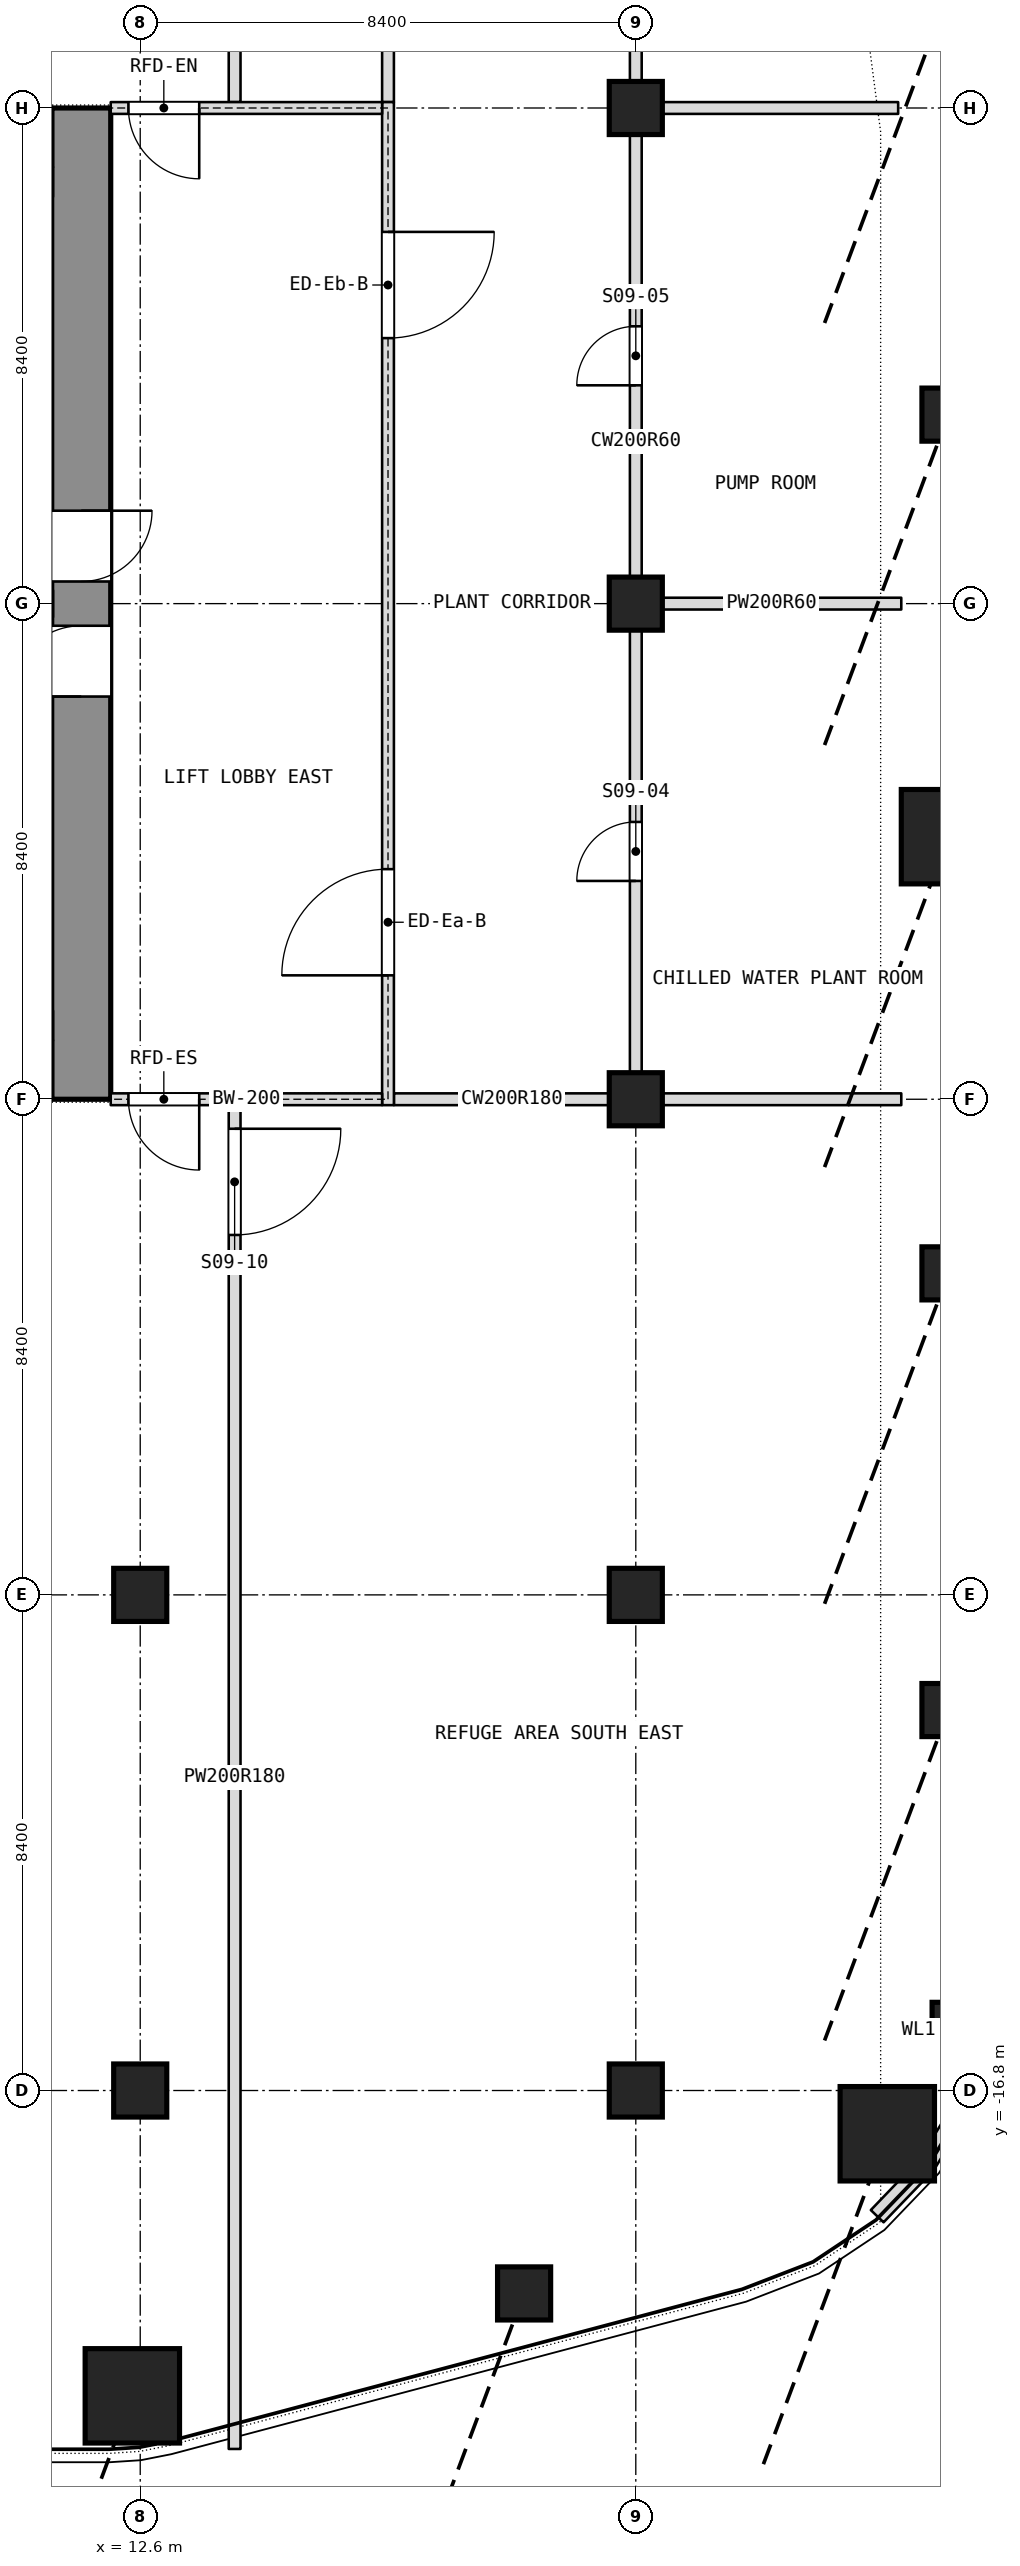
"""IFC4 building model, lengths in metres.
Left out: names, types, materials, properties, quantities, classifications, styles, units other than length and angle.
Written with IfcOpenShell. Run it as: python <this file> out.ifc"""

import sys

from ifc_helpers import new_model, si_unit, direction, frame, frame_2d, origin, origin_2d, place, context, subcontext, project, spatial, rectangle, i_section, extrude, element, fill, save


model = new_model("IFC4")
c1 = context("Model", 3, precision=1e-05, world=origin(), true_north=direction((0.0, 1.0)))
c2 = subcontext(c1, "Body", "Model", "MODEL_VIEW")
j1 = project(units=[si_unit("LENGTHUNIT", "METRE"), si_unit("PLANEANGLEUNIT", "RADIAN")], contexts=[c1])
p1 = place(None, origin())
s1 = spatial("IfcSite", under=j1, at=p1, CompositionType="ELEMENT")
p2 = place(p1, origin())
s2 = spatial("IfcBuilding", under=s1, at=p2, CompositionType="ELEMENT")
p3 = place(p2, frame((0.0, 0.0, 169.7)))
s3 = spatial("IfcBuildingStorey", under=s2, at=p3, CompositionType="ELEMENT", Elevation=169.7)
p4 = place(p3, frame((11.6, 0.0, 0.0), z_axis=(0.0, 0.0, 1.0), x_axis=(0.0, 1.0, 0.0)))
e1 = element("IfcWall", 1, at=p4, inside=s3, PredefinedType="SHEAR", context=c2, shape_type="SweptSolid", body=[
    extrude(rectangle(XDim=16.8, YDim=1.0, at=frame_2d((8.4, 0.0))), origin(), (0.0, 0.0, 1.0), 10.8),
])
p5 = place(p4, frame((6.825, 0.0, 0.0)))
e2 = element("IfcOpeningElement", 2, at=p5, cuts=e1, PredefinedType="OPENING", context=c2, shape_type="SweptSolid", body=[
    extrude(rectangle(XDim=1.2, YDim=2.1, at=frame_2d((0.6, 1.05))), frame((0.0, 0.5, 0.0), z_axis=(0.0, -1.0, 0.0), x_axis=(1.0, 0.0, 0.0)), (0.0, 0.0, 1.0), 1.0),
])
p6 = place(p4, frame((8.775, 0.0, 0.0)))
e3 = element("IfcOpeningElement", 3, at=p6, cuts=e1, PredefinedType="OPENING", context=c2, shape_type="SweptSolid", body=[
    extrude(rectangle(XDim=1.2, YDim=2.1, at=frame_2d((0.6, 1.05))), frame((0.0, 0.5, 0.0), z_axis=(0.0, -1.0, 0.0), x_axis=(1.0, 0.0, 0.0)), (0.0, 0.0, 1.0), 1.0),
])
for number, where, z_axis, x_axis in (
    (4, (12.6, -16.8, 0.0), (0.0, 0.0, 1.0), (1.0, 0.0, 0.0)),
    (5, (12.6, -8.4, 0.0), (0.0, 0.0, 1.0), (1.0, 0.0, 0.0)),
    (6, (21.0, -16.8, 0.0), (0.0, 0.0, 1.0), (1.0, 0.0, 0.0)),
    (7, (21.0, -8.4, 0.0), (0.0, 0.0, 1.0), (1.0, 0.0, 0.0)),
    (8, (21.0, 0.0, 0.0), (0.0, 0.0, 1.0), (1.0, 0.0, 0.0)),
    (9, (21.0, 8.4, 0.0), (0.0, 0.0, 1.0), (1.0, 0.0, 0.0)),
    (10, (21.0, 16.8, 0.0), (0.0, 0.0, 1.0), (1.0, 0.0, 0.0)),
):
    element("IfcColumn", number, at=place(p3, frame(where, z_axis=z_axis, x_axis=x_axis)), inside=s3, PredefinedType="COLUMN", context=c2, shape_type="SweptSolid", body=[
        extrude(rectangle(XDim=0.9, YDim=0.9, at=origin_2d()), origin(), (0.0, 0.0, 1.0), 10.8),
    ])
for number, where, z_axis, x_axis in (
    (11, (26.3, 11.603, 0.0), (0.0, 0.0, 1.0), (1.0, 0.0, 0.0)),
    (12, (26.3, 4.45, 0.0), (0.0, 0.0, 1.0), (1.0, 0.0, 0.0)),
    (13, (26.3, -2.951, 0.0), (0.0, 0.0, 1.0), (1.0, 0.0, 0.0)),
    (14, (26.3, -10.352, 0.0), (0.0, 0.0, 1.0), (1.0, 0.0, 0.0)),
):
    element("IfcColumn", number, at=place(p3, frame(where, z_axis=z_axis, x_axis=x_axis)), inside=s3, PredefinedType="COLUMN", context=c2, shape_type="SweptSolid", body=[
        extrude(i_section(OverallWidth=0.306, OverallDepth=0.524, WebThickness=0.024, FlangeThickness=0.04, FilletRadius=0.027, at=origin_2d()), origin(), (0.0, 0.0, 1.0), 10.14),
    ])
p7 = place(p3, frame((26.175, -15.567, -0.3), z_axis=(0.0, 0.0, 1.0), x_axis=(1.0, 0.0, 0.0)))
e15 = element("IfcColumn", 15, at=p7, inside=s3, PredefinedType="COLUMN", context=c2, shape_type="SweptSolid", body=[
    extrude(i_section(OverallWidth=0.306, OverallDepth=0.524, WebThickness=0.024, FlangeThickness=0.04, FilletRadius=0.027, at=origin_2d()), origin(), (0.0, 0.0, 1.0), 10.44),
])
p8 = place(p3, frame((25.258, -17.529, 0.0), z_axis=(0.0, 0.0, 1.0), x_axis=(1.0, 0.0, 0.0)))
e16 = element("IfcColumn", 16, at=p8, inside=s3, PredefinedType="COLUMN", context=c2, shape_type="SweptSolid", body=[
    extrude(i_section(OverallWidth=0.306, OverallDepth=0.524, WebThickness=0.024, FlangeThickness=0.04, FilletRadius=0.027, at=origin_2d()), origin(), (0.0, 0.0, 1.0), 10.14),
])
p9 = place(p3, frame((21.0, -0.1, 0.0), z_axis=(0.0, 0.0, 1.0), x_axis=(0.0, 1.0, 0.0)))
e17 = element("IfcWall", 17, at=p9, inside=s3, PredefinedType="PARTITIONING", context=c2, shape_type="SweptSolid", body=[
    extrude(rectangle(XDim=22.493, YDim=0.2, at=frame_2d((11.247, 0.0))), origin(), (0.0, 0.0, 1.0), 10.14),
])
p10 = place(p9, frame((3.8, 0.0, 0.0)))
e18 = element("IfcOpeningElement", 18, at=p10, cuts=e17, PredefinedType="OPENING", context=c2, shape_type="SweptSolid", body=[
    extrude(rectangle(XDim=1.0, YDim=2.1, at=frame_2d((0.5, 1.05))), frame((0.0, 0.1, 0.0), z_axis=(0.0, -1.0, 0.0), x_axis=(1.0, 0.0, 0.0)), (0.0, 0.0, 1.0), 0.2),
])
p11 = place(p9, frame((12.2, 0.0, 0.0)))
e19 = element("IfcOpeningElement", 19, at=p11, cuts=e17, PredefinedType="OPENING", context=c2, shape_type="SweptSolid", body=[
    extrude(rectangle(XDim=1.0, YDim=2.1, at=frame_2d((0.5, 1.05))), frame((0.0, 0.1, 0.0), z_axis=(0.0, -1.0, 0.0), x_axis=(1.0, 0.0, 0.0)), (0.0, 0.0, 1.0), 0.2),
])
p12 = place(p9, frame((19.146, 0.0, 0.0)))
e20 = element("IfcOpeningElement", 20, at=p12, cuts=e17, PredefinedType="OPENING", context=c2, shape_type="SweptSolid", body=[
    extrude(rectangle(XDim=1.0, YDim=2.1, at=frame_2d((0.5, 1.05))), frame((0.0, 0.1, 0.0), z_axis=(0.0, -1.0, 0.0), x_axis=(1.0, 0.0, 0.0)), (0.0, 0.0, 1.0), 0.2),
])
p13 = place(p3, frame((16.8, 16.9, 0.0), z_axis=(0.0, 0.0, 1.0), x_axis=(0.0, 1.0, 0.0)))
e21 = element("IfcWall", 21, at=p13, inside=s3, PredefinedType="PARTITIONING", context=c2, shape_type="SweptSolid", body=[
    extrude(rectangle(XDim=5.8, YDim=0.2, at=frame_2d((2.9, 0.0))), origin(), (0.0, 0.0, 1.0), 10.14),
])
p14 = place(p13, frame((2.4, 0.0, 0.0)))
e22 = element("IfcOpeningElement", 22, at=p14, cuts=e21, PredefinedType="OPENING", context=c2, shape_type="SweptSolid", body=[
    extrude(rectangle(XDim=1.0, YDim=2.1, at=frame_2d((0.5, 1.05))), frame((0.0, 0.1, 0.0), z_axis=(0.0, -1.0, 0.0), x_axis=(1.0, 0.0, 0.0)), (0.0, 0.0, 1.0), 0.2),
])
p15 = place(p3, frame((14.2, -22.875, 0.0), z_axis=(0.0, 0.0, 1.0), x_axis=(0.0, 1.0, 0.0)))
e23 = element("IfcWall", 23, at=p15, inside=s3, PredefinedType="PARTITIONING", context=c2, shape_type="SweptSolid", body=[
    extrude(rectangle(XDim=22.775, YDim=0.2, at=frame_2d((11.387, 0.0))), origin(), (0.0, 0.0, 1.0), 10.54),
])
p16 = place(p15, frame((20.575, 0.0, 0.0)))
e24 = element("IfcOpeningElement", 24, at=p16, cuts=e23, PredefinedType="OPENING", context=c2, shape_type="SweptSolid", body=[
    extrude(rectangle(XDim=1.8, YDim=2.1, at=frame_2d((0.9, 1.05))), frame((0.0, 0.1, 0.0), z_axis=(0.0, -1.0, 0.0), x_axis=(1.0, 0.0, 0.0)), (0.0, 0.0, 1.0), 0.2),
])
p17 = place(p3, frame((14.2, 16.9, 0.0), z_axis=(0.0, 0.0, 1.0), x_axis=(0.0, 1.0, 0.0)))
e25 = element("IfcWall", 25, at=p17, inside=s3, PredefinedType="PARTITIONING", context=c2, shape_type="SweptSolid", body=[
    extrude(rectangle(XDim=5.8, YDim=0.2, at=frame_2d((2.9, 0.0))), origin(), (0.0, 0.0, 1.0), 10.54),
])
p18 = place(p3, frame((21.1, 0.0, 0.0), z_axis=(0.0, 0.0, 1.0), x_axis=(1.0, 0.0, 0.0)))
e26 = element("IfcWall", 26, at=p18, inside=s3, PredefinedType="PARTITIONING", context=c2, shape_type="SweptSolid", body=[
    extrude(rectangle(XDim=4.4, YDim=0.2, at=frame_2d((2.2, 0.0))), origin(), (0.0, 0.0, 1.0), 10.14),
])
p19 = place(p3, frame((16.9, 0.0, 0.0), z_axis=(0.0, 0.0, 1.0), x_axis=(1.0, 0.0, 0.0)))
e27 = element("IfcWall", 27, at=p19, inside=s3, PredefinedType="PARTITIONING", context=c2, shape_type="SweptSolid", body=[
    extrude(rectangle(XDim=4.0, YDim=0.2, at=frame_2d((2.0, 0.0))), origin(), (0.0, 0.0, 1.0), 10.14),
])
p20 = place(p3, frame((21.1, 8.4, 0.0), z_axis=(0.0, 0.0, 1.0), x_axis=(1.0, 0.0, 0.0)))
e28 = element("IfcWall", 28, at=p20, inside=s3, PredefinedType="PARTITIONING", context=c2, shape_type="SweptSolid", body=[
    extrude(rectangle(XDim=4.4, YDim=0.2, at=frame_2d((2.2, 0.0))), origin(), (0.0, 0.0, 1.0), 10.14),
])
p21 = place(p3, frame((21.1, 16.8, 0.0), z_axis=(0.0, 0.0, 1.0), x_axis=(1.0, 0.0, 0.0)))
e29 = element("IfcWall", 29, at=p21, inside=s3, PredefinedType="PARTITIONING", context=c2, shape_type="SweptSolid", body=[
    extrude(rectangle(XDim=4.347, YDim=0.2, at=frame_2d((2.173, 0.0))), origin(), (0.0, 0.0, 1.0), 10.14),
])
p22 = place(p3, frame((26.608, -16.947, 10.8), z_axis=(0.0, 0.0, 1.0), x_axis=(-0.519698377403, -0.854349809226, 0.0)))
e30 = element("IfcWall", 30, at=p22, inside=s3, PredefinedType="PARAPET", context=c2, shape_type="SweptSolid", body=[
    extrude(rectangle(XDim=1.309, YDim=0.3, at=frame_2d((0.654, 0.0))), origin(), (0.0, 0.0, 1.0), 1.1),
])
p23 = place(p3, frame((25.948, -18.039, 10.8), z_axis=(0.0, 0.0, 1.0), x_axis=(-0.692535941108, -0.721383372607, 0.0)))
e31 = element("IfcWall", 31, at=p23, inside=s3, PredefinedType="PARAPET", context=c2, shape_type="SweptSolid", body=[
    extrude(rectangle(XDim=1.236, YDim=0.3, at=frame_2d((0.618, 0.0))), origin(), (0.0, 0.0, 1.0), 1.1),
])
p24 = place(p3, frame((16.8, -0.1, 0.0), z_axis=(0.0, 0.0, 1.0), x_axis=(0.0, 1.0, 0.0)))
e32 = element("IfcWall", 32, at=p24, inside=s3, PredefinedType="PARTITIONING", context=c2, shape_type="SweptSolid", body=[
    extrude(rectangle(XDim=17.0, YDim=0.2, at=frame_2d((8.5, 0.0))), origin(), (0.0, 0.0, 1.0), 10.54),
])
p25 = place(p24, frame((2.2, 0.0, 0.0)))
e33 = element("IfcOpeningElement", 33, at=p25, cuts=e32, PredefinedType="OPENING", context=c2, shape_type="SweptSolid", body=[
    extrude(rectangle(XDim=1.8, YDim=2.1, at=frame_2d((0.9, 1.05))), frame((0.0, 0.1, 0.0), z_axis=(0.0, -1.0, 0.0), x_axis=(1.0, 0.0, 0.0)), (0.0, 0.0, 1.0), 0.2),
])
p26 = place(p24, frame((13.0, 0.0, 0.0)))
e34 = element("IfcOpeningElement", 34, at=p26, cuts=e32, PredefinedType="OPENING", context=c2, shape_type="SweptSolid", body=[
    extrude(rectangle(XDim=1.8, YDim=2.1, at=frame_2d((0.9, 1.05))), frame((0.0, 0.1, 0.0), z_axis=(0.0, -1.0, 0.0), x_axis=(1.0, 0.0, 0.0)), (0.0, 0.0, 1.0), 0.2),
])
p27 = place(p3, frame((12.1, 0.0, 0.0), z_axis=(0.0, 0.0, 1.0), x_axis=(1.0, 0.0, 0.0)))
e35 = element("IfcWall", 35, at=p27, inside=s3, PredefinedType="PARTITIONING", context=c2, shape_type="SweptSolid", body=[
    extrude(rectangle(XDim=4.6, YDim=0.2, at=frame_2d((2.3, 0.0))), origin(), (0.0, 0.0, 1.0), 10.14),
])
p28 = place(p27, frame((0.3, 0.0, 0.0)))
e36 = element("IfcOpeningElement", 36, at=p28, cuts=e35, PredefinedType="OPENING", context=c2, shape_type="SweptSolid", body=[
    extrude(rectangle(XDim=1.2, YDim=2.1, at=frame_2d((0.6, 1.05))), frame((0.0, 0.1, 0.0), z_axis=(0.0, -1.0, 0.0), x_axis=(1.0, 0.0, 0.0)), (0.0, 0.0, 1.0), 0.2),
])
p29 = place(p3, frame((12.1, 16.8, 0.0), z_axis=(0.0, 0.0, 1.0), x_axis=(1.0, 0.0, 0.0)))
e37 = element("IfcWall", 37, at=p29, inside=s3, PredefinedType="PARTITIONING", context=c2, shape_type="SweptSolid", body=[
    extrude(rectangle(XDim=4.6, YDim=0.2, at=frame_2d((2.3, 0.0))), origin(), (0.0, 0.0, 1.0), 10.14),
])
p30 = place(p29, frame((0.3, 0.0, 0.0)))
e38 = element("IfcOpeningElement", 38, at=p30, cuts=e37, PredefinedType="OPENING", context=c2, shape_type="SweptSolid", body=[
    extrude(rectangle(XDim=1.2, YDim=2.1, at=frame_2d((0.6, 1.05))), frame((0.0, 0.1, 0.0), z_axis=(0.0, -1.0, 0.0), x_axis=(1.0, 0.0, 0.0)), (0.0, 0.0, 1.0), 0.2),
])
p31 = place(p10, origin())
e39 = element("IfcDoor", 39, at=p31, inside=s3, OperationType="SINGLE_SWING_LEFT", PredefinedType="DOOR", context=c2, shape_type="SweptSolid", body=[
    extrude(rectangle(XDim=1.0, YDim=2.1, at=frame_2d((0.5, 1.05))), frame((0.0, 0.025, 0.0), z_axis=(0.0, -1.0, 0.0), x_axis=(1.0, 0.0, 0.0)), (0.0, 0.0, 1.0), 0.05),
])
fill(e18, e39)
p32 = place(p11, origin())
e40 = element("IfcDoor", 40, at=p32, inside=s3, OperationType="SINGLE_SWING_RIGHT", PredefinedType="DOOR", context=c2, shape_type="SweptSolid", body=[
    extrude(rectangle(XDim=1.0, YDim=2.1, at=frame_2d((0.5, 1.05))), frame((0.0, 0.025, 0.0), z_axis=(0.0, -1.0, 0.0), x_axis=(1.0, 0.0, 0.0)), (0.0, 0.0, 1.0), 0.05),
])
fill(e19, e40)
p33 = place(p16, origin())
e41 = element("IfcDoor", 41, at=p33, inside=s3, OperationType="DOUBLE_DOOR_SINGLE_SWING", PredefinedType="DOOR", context=c2, shape_type="SweptSolid", body=[
    extrude(rectangle(XDim=1.8, YDim=2.1, at=frame_2d((0.9, 1.05))), frame((0.0, 0.025, 0.0), z_axis=(0.0, -1.0, 0.0), x_axis=(1.0, 0.0, 0.0)), (0.0, 0.0, 1.0), 0.05),
])
fill(e24, e41)
p34 = place(p5, origin())
e42 = element("IfcDoor", 42, at=p34, inside=s3, OperationType="SINGLE_SWING_LEFT", PredefinedType="DOOR", context=c2, shape_type="SweptSolid", body=[
    extrude(rectangle(XDim=1.2, YDim=2.1, at=frame_2d((0.6, 1.05))), frame((0.0, 0.025, 0.0), z_axis=(0.0, -1.0, 0.0), x_axis=(1.0, 0.0, 0.0)), (0.0, 0.0, 1.0), 0.05),
])
fill(e2, e42)
p35 = place(p6, origin())
e43 = element("IfcDoor", 43, at=p35, inside=s3, OperationType="SINGLE_SWING_LEFT", PredefinedType="DOOR", context=c2, shape_type="SweptSolid", body=[
    extrude(rectangle(XDim=1.2, YDim=2.1, at=frame_2d((0.6, 1.05))), frame((0.0, 0.025, 0.0), z_axis=(0.0, -1.0, 0.0), x_axis=(1.0, 0.0, 0.0)), (0.0, 0.0, 1.0), 0.05),
])
fill(e3, e43)
p36 = place(p25, origin())
e44 = element("IfcDoor", 44, at=p36, inside=s3, OperationType="DOUBLE_DOOR_SINGLE_SWING", PredefinedType="DOOR", context=c2, shape_type="SweptSolid", body=[
    extrude(rectangle(XDim=1.8, YDim=2.1, at=frame_2d((0.9, 1.05))), frame((0.0, 0.025, 0.0), z_axis=(0.0, -1.0, 0.0), x_axis=(1.0, 0.0, 0.0)), (0.0, 0.0, 1.0), 0.05),
])
fill(e33, e44)
p37 = place(p26, origin())
e45 = element("IfcDoor", 45, at=p37, inside=s3, OperationType="DOUBLE_DOOR_SINGLE_SWING", PredefinedType="DOOR", context=c2, shape_type="SweptSolid", body=[
    extrude(rectangle(XDim=1.8, YDim=2.1, at=frame_2d((0.9, 1.05))), frame((0.0, 0.025, 0.0), z_axis=(0.0, -1.0, 0.0), x_axis=(1.0, 0.0, 0.0)), (0.0, 0.0, 1.0), 0.05),
])
fill(e34, e45)
p38 = place(p28, origin())
e46 = element("IfcDoor", 46, at=p38, inside=s3, OperationType="SINGLE_SWING_LEFT", PredefinedType="DOOR", context=c2, shape_type="SweptSolid", body=[
    extrude(rectangle(XDim=1.2, YDim=2.1, at=frame_2d((0.6, 1.05))), frame((0.0, 0.025, 0.0), z_axis=(0.0, -1.0, 0.0), x_axis=(1.0, 0.0, 0.0)), (0.0, 0.0, 1.0), 0.05),
])
fill(e36, e46)
p39 = place(p30, origin())
e47 = element("IfcDoor", 47, at=p39, inside=s3, OperationType="SINGLE_SWING_LEFT", PredefinedType="DOOR", context=c2, shape_type="SweptSolid", body=[
    extrude(rectangle(XDim=1.2, YDim=2.1, at=frame_2d((0.6, 1.05))), frame((0.0, 0.025, 0.0), z_axis=(0.0, -1.0, 0.0), x_axis=(1.0, 0.0, 0.0)), (0.0, 0.0, 1.0), 0.05),
])
fill(e38, e47)
save(model, sys.argv[1])
